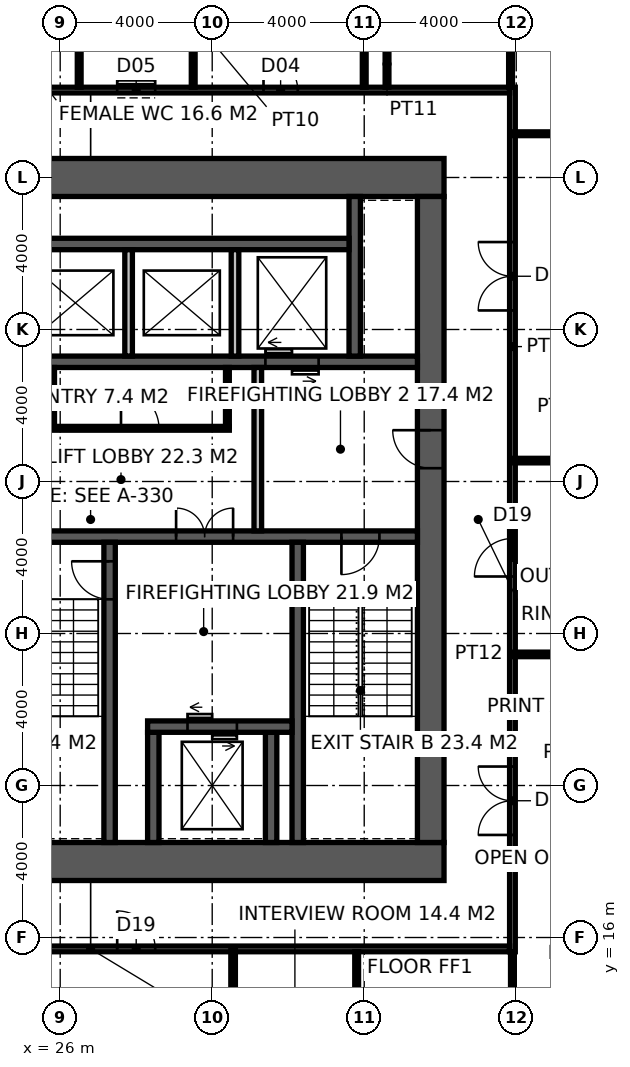
"""IFC4 building model, lengths in metres.
Left out: names, types, materials, properties, quantities, classifications, styles, units other than length and angle.
Written with IfcOpenShell. Run it as: python <this file> out.ifc"""

import sys

from ifc_helpers import new_model, si_unit, direction, frame, frame_2d, origin, place, context, subcontext, project, spatial, rectangle, extrude, element, fill, save


model = new_model("IFC4")
c1 = context("Model", 3, precision=1e-05, world=origin(), true_north=direction((0.0, 1.0)))
c2 = subcontext(c1, "Body", "Model", "MODEL_VIEW")
j1 = project(units=[si_unit("LENGTHUNIT", "METRE"), si_unit("PLANEANGLEUNIT", "RADIAN")], contexts=[c1])
p1 = place(None, origin())
s1 = spatial("IfcSite", under=j1, at=p1, CompositionType="ELEMENT")
p2 = place(p1, origin())
s2 = spatial("IfcBuilding", under=s1, at=p2, CompositionType="ELEMENT")
p3 = place(p2, frame((0.0, 0.0, 171.8)))
s3 = spatial("IfcBuildingStorey", under=s2, at=p3, CompositionType="ELEMENT", Elevation=171.8)
p4 = place(p3, frame((18.5, 18.0, -0.15), z_axis=(0.0, 0.0, 1.0), x_axis=(1.0, 0.0, 0.0)))
e1 = element("IfcWall", 1, at=p4, inside=s3, PredefinedType="SHEAR", context=c2, shape_type="SweptSolid", body=[
    extrude(rectangle(XDim=17.6, YDim=1.0, at=frame_2d((8.8, 0.0))), origin(), (0.0, 0.0, 1.0), 4.0),
])
p5 = place(p4, frame((3.45, 0.0, 0.15)))
e2 = element("IfcOpeningElement", 2, at=p5, cuts=e1, PredefinedType="OPENING", context=c2, shape_type="SweptSolid", body=[
    extrude(rectangle(XDim=1.5, YDim=2.4, at=frame_2d((0.75, 1.2))), frame((0.0, 0.51, 0.0), z_axis=(0.0, -1.0, 0.0), x_axis=(1.0, 0.0, 0.0)), (0.0, 0.0, 1.0), 1.02),
])
p6 = place(p3, frame((18.5, 36.0, -0.15), z_axis=(0.0, 0.0, 1.0), x_axis=(1.0, 0.0, 0.0)))
e3 = element("IfcWall", 3, at=p6, inside=s3, PredefinedType="SHEAR", context=c2, shape_type="SweptSolid", body=[
    extrude(rectangle(XDim=17.6, YDim=1.0, at=frame_2d((8.8, 0.0))), origin(), (0.0, 0.0, 1.0), 4.0),
])
p7 = place(p3, frame((35.75, 18.5, -0.15), z_axis=(0.0, 0.0, 1.0), x_axis=(0.0, 1.0, 0.0)))
e4 = element("IfcWall", 4, at=p7, inside=s3, PredefinedType="SHEAR", context=c2, shape_type="SweptSolid", body=[
    extrude(rectangle(XDim=17.0, YDim=0.7, at=frame_2d((8.5, 0.0))), origin(), (0.0, 0.0, 1.0), 4.0),
])
p8 = place(p7, frame((9.85, 0.0, 0.15)))
e5 = element("IfcOpeningElement", 5, at=p8, cuts=e4, PredefinedType="OPENING", context=c2, shape_type="SweptSolid", body=[
    extrude(rectangle(XDim=1.0, YDim=2.2, at=frame_2d((0.5, 1.1))), frame((0.0, 0.36, 0.0), z_axis=(0.0, -1.0, 0.0), x_axis=(1.0, 0.0, 0.0)), (0.0, 0.0, 1.0), 0.72),
])
p9 = place(p3, frame((24.15, 26.55, -0.15), z_axis=(0.0, 0.0, 1.0), x_axis=(1.0, 0.0, 0.0)))
e6 = element("IfcWall", 6, at=p9, inside=s3, PredefinedType="SHEAR", context=c2, shape_type="SweptSolid", body=[
    extrude(rectangle(XDim=11.25, YDim=0.3, at=frame_2d((5.625, 0.0))), origin(), (0.0, 0.0, 1.0), 4.0),
])
p10 = place(p9, frame((9.25, 0.0, 0.15)))
e7 = element("IfcOpeningElement", 7, at=p10, cuts=e6, PredefinedType="OPENING", context=c2, shape_type="SweptSolid", body=[
    extrude(rectangle(XDim=1.0, YDim=2.2, at=frame_2d((0.5, 1.1))), frame((0.0, 0.16, 0.0), z_axis=(0.0, -1.0, 0.0), x_axis=(1.0, 0.0, 0.0)), (0.0, 0.0, 1.0), 0.32),
])
p11 = place(p9, frame((4.9, 0.0, 0.15)))
e8 = element("IfcOpeningElement", 8, at=p11, cuts=e6, PredefinedType="OPENING", context=c2, shape_type="SweptSolid", body=[
    extrude(rectangle(XDim=1.5, YDim=2.4, at=frame_2d((0.75, 1.2))), frame((0.0, 0.16, 0.0), z_axis=(0.0, -1.0, 0.0), x_axis=(1.0, 0.0, 0.0)), (0.0, 0.0, 1.0), 0.32),
])
p12 = place(p3, frame((27.3, 18.5, -0.15), z_axis=(0.0, 0.0, 1.0), x_axis=(0.0, 1.0, 0.0)))
e9 = element("IfcWall", 9, at=p12, inside=s3, PredefinedType="SHEAR", context=c2, shape_type="SweptSolid", body=[
    extrude(rectangle(XDim=7.9, YDim=0.3, at=frame_2d((3.95, 0.0))), origin(), (0.0, 0.0, 1.0), 4.0),
])
p13 = place(p12, frame((6.4, 0.0, 0.15)))
e10 = element("IfcOpeningElement", 10, at=p13, cuts=e9, PredefinedType="OPENING", context=c2, shape_type="SweptSolid", body=[
    extrude(rectangle(XDim=1.0, YDim=2.2, at=frame_2d((0.5, 1.1))), frame((0.0, 0.16, 0.0), z_axis=(0.0, -1.0, 0.0), x_axis=(1.0, 0.0, 0.0)), (0.0, 0.0, 1.0), 0.32),
])
p14 = place(p3, frame((32.25, 18.5, -0.15), z_axis=(0.0, 0.0, 1.0), x_axis=(0.0, 1.0, 0.0)))
e11 = element("IfcWall", 11, at=p14, inside=s3, PredefinedType="SHEAR", context=c2, shape_type="SweptSolid", body=[
    extrude(rectangle(XDim=7.9, YDim=0.3, at=frame_2d((3.95, 0.0))), origin(), (0.0, 0.0, 1.0), 4.0),
])
for number, where, z_axis, x_axis in (
    (12, (28.45, 18.5, -0.15), (0.0, 0.0, 1.0), (0.0, 1.0, 0.0)),
    (13, (31.55, 18.5, -0.15), (0.0, 0.0, 1.0), (0.0, 1.0, 0.0)),
):
    element("IfcWall", number, at=place(p3, frame(where, z_axis=z_axis, x_axis=x_axis)), inside=s3, PredefinedType="SHEAR", context=c2, shape_type="SweptSolid", body=[
        extrude(rectangle(XDim=2.9, YDim=0.3, at=frame_2d((1.45, 0.0))), origin(), (0.0, 0.0, 1.0), 4.0),
    ])
p15 = place(p3, frame((28.3, 21.55, -0.15), z_axis=(0.0, 0.0, 1.0), x_axis=(1.0, 0.0, 0.0)))
e14 = element("IfcWall", 14, at=p15, inside=s3, PredefinedType="SHEAR", context=c2, shape_type="SweptSolid", body=[
    extrude(rectangle(XDim=3.8, YDim=0.3, at=frame_2d((1.9, 0.0))), origin(), (0.0, 0.0, 1.0), 4.0),
])
p16 = place(p15, frame((1.05, 0.0, 0.15)))
e15 = element("IfcOpeningElement", 15, at=p16, cuts=e14, PredefinedType="OPENING", context=c2, shape_type="SweptSolid", body=[
    extrude(rectangle(XDim=1.3, YDim=2.4, at=frame_2d((0.65, 1.2))), frame((0.0, 0.16, 0.0), z_axis=(0.0, -1.0, 0.0), x_axis=(1.0, 0.0, 0.0)), (0.0, 0.0, 1.0), 0.32),
])
p17 = place(p3, frame((24.15, 31.15, -0.15), z_axis=(0.0, 0.0, 1.0), x_axis=(1.0, 0.0, 0.0)))
e16 = element("IfcWall", 16, at=p17, inside=s3, PredefinedType="SHEAR", context=c2, shape_type="SweptSolid", body=[
    extrude(rectangle(XDim=11.25, YDim=0.3, at=frame_2d((5.625, 0.0))), origin(), (0.0, 0.0, 1.0), 4.0),
])
p18 = place(p17, frame((7.25, 0.0, 0.15)))
e17 = element("IfcOpeningElement", 17, at=p18, cuts=e16, PredefinedType="OPENING", context=c2, shape_type="SweptSolid", body=[
    extrude(rectangle(XDim=1.4, YDim=2.4, at=frame_2d((0.7, 1.2))), frame((0.0, 0.16, 0.0), z_axis=(0.0, -1.0, 0.0), x_axis=(1.0, 0.0, 0.0)), (0.0, 0.0, 1.0), 0.32),
])
p19 = place(p3, frame((33.75, 31.3, -0.15), z_axis=(0.0, 0.0, 1.0), x_axis=(0.0, 1.0, 0.0)))
e18 = element("IfcWall", 18, at=p19, inside=s3, PredefinedType="SHEAR", context=c2, shape_type="SweptSolid", body=[
    extrude(rectangle(XDim=4.2, YDim=0.3, at=frame_2d((2.1, 0.0))), origin(), (0.0, 0.0, 1.0), 4.0),
])
p20 = place(p3, frame((25.0, 34.25, -0.15), z_axis=(0.0, 0.0, 1.0), x_axis=(1.0, 0.0, 0.0)))
e19 = element("IfcWall", 19, at=p20, inside=s3, PredefinedType="SHEAR", context=c2, shape_type="SweptSolid", body=[
    extrude(rectangle(XDim=8.6, YDim=0.3, at=frame_2d((4.3, 0.0))), origin(), (0.0, 0.0, 1.0), 4.0),
])
for number, where, z_axis, x_axis in (
    (20, (27.8, 31.3, -0.15), (0.0, 0.0, 1.0), (0.0, 1.0, 0.0)),
    (21, (30.6, 31.3, -0.15), (0.0, 0.0, 1.0), (0.0, 1.0, 0.0)),
):
    element("IfcWall", number, at=place(p3, frame(where, z_axis=z_axis, x_axis=x_axis)), inside=s3, PredefinedType="SOLIDWALL", context=c2, shape_type="SweptSolid", body=[
        extrude(rectangle(XDim=2.8, YDim=0.2, at=frame_2d((1.4, 0.0))), origin(), (0.0, 0.0, 1.0), 4.0),
    ])
p21 = place(p3, frame((31.2, 26.7, 0.0), z_axis=(0.0, 0.0, 1.0), x_axis=(0.0, 1.0, 0.0)))
e22 = element("IfcWall", 22, at=p21, inside=s3, PredefinedType="SOLIDWALL", context=c2, shape_type="SweptSolid", body=[
    extrude(rectangle(XDim=4.3, YDim=0.2, at=frame_2d((2.15, 0.0))), origin(), (0.0, 0.0, 1.0), 3.85),
])
p22 = place(p3, frame((25.75, 29.4, 0.0), z_axis=(0.0, 0.0, 1.0), x_axis=(1.0, 0.0, 0.0)))
e23 = element("IfcWall", 23, at=p22, inside=s3, PredefinedType="PARTITIONING", context=c2, shape_type="SweptSolid", body=[
    extrude(rectangle(XDim=4.7, YDim=0.1, at=frame_2d((2.35, 0.0))), origin(), (0.0, 0.0, 1.0), 3.85),
])
p23 = place(p22, frame((1.85, 0.0, 0.0)))
e24 = element("IfcOpeningElement", 24, at=p23, cuts=e23, PredefinedType="OPENING", context=c2, shape_type="SweptSolid", body=[
    extrude(rectangle(XDim=1.0, YDim=2.2, at=frame_2d((0.5, 1.1))), frame((0.0, 0.06, 0.0), z_axis=(0.0, -1.0, 0.0), x_axis=(1.0, 0.0, 0.0)), (0.0, 0.0, 1.0), 0.12),
])
for number, where, z_axis, x_axis in (
    (25, (25.8, 29.45, 0.0), (0.0, 0.0, 1.0), (0.0, 1.0, 0.0)),
    (26, (30.4, 29.45, 0.0), (0.0, 0.0, 1.0), (0.0, 1.0, 0.0)),
):
    element("IfcWall", number, at=place(p3, frame(where, z_axis=z_axis, x_axis=x_axis)), inside=s3, PredefinedType="PARTITIONING", context=c2, shape_type="SweptSolid", body=[
        extrude(rectangle(XDim=1.55, YDim=0.1, at=frame_2d((0.775, 0.0))), origin(), (0.0, 0.0, 1.0), 3.85),
    ])
p24 = place(p3, frame((37.9, 15.625, 0.0), z_axis=(0.0, 0.0, 1.0), x_axis=(0.0, 1.0, 0.0)))
e27 = element("IfcWall", 27, at=p24, inside=s3, PredefinedType="PARTITIONING", context=c2, shape_type="SweptSolid", body=[
    extrude(rectangle(XDim=22.75, YDim=0.15, at=frame_2d((11.375, 0.0))), origin(), (0.0, 0.0, 1.0), 2.65),
])
p25 = place(p24, frame((3.074, 0.0, 0.0)))
e28 = element("IfcOpeningElement", 28, at=p25, cuts=e27, PredefinedType="OPENING", context=c2, shape_type="SweptSolid", body=[
    extrude(rectangle(XDim=1.8, YDim=2.4, at=frame_2d((0.9, 1.2))), frame((0.0, 0.085, 0.0), z_axis=(0.0, -1.0, 0.0), x_axis=(1.0, 0.0, 0.0)), (0.0, 0.0, 1.0), 0.17),
])
p26 = place(p24, frame((16.876, 0.0, 0.0)))
e29 = element("IfcOpeningElement", 29, at=p26, cuts=e27, PredefinedType="OPENING", context=c2, shape_type="SweptSolid", body=[
    extrude(rectangle(XDim=1.8, YDim=2.4, at=frame_2d((0.9, 1.2))), frame((0.0, 0.085, 0.0), z_axis=(0.0, -1.0, 0.0), x_axis=(1.0, 0.0, 0.0)), (0.0, 0.0, 1.0), 0.17),
])
p27 = place(p24, frame((9.875, 0.0, 0.0)))
e30 = element("IfcOpeningElement", 30, at=p27, cuts=e27, PredefinedType="OPENING", context=c2, shape_type="SweptSolid", body=[
    extrude(rectangle(XDim=1.0, YDim=2.2, at=frame_2d((0.5, 1.1))), frame((0.0, 0.085, 0.0), z_axis=(0.0, -1.0, 0.0), x_axis=(1.0, 0.0, 0.0)), (0.0, 0.0, 1.0), 0.17),
])
p28 = place(p3, frame((15.775, 15.7, 0.0), z_axis=(0.0, 0.0, 1.0), x_axis=(1.0, 0.0, 0.0)))
e31 = element("IfcWall", 31, at=p28, inside=s3, PredefinedType="PARTITIONING", context=c2, shape_type="SweptSolid", body=[
    extrude(rectangle(XDim=22.05, YDim=0.15, at=frame_2d((11.025, 0.0))), origin(), (0.0, 0.0, 1.0), 3.85),
])
p29 = place(p28, frame((11.725, 0.0, 0.0)))
e32 = element("IfcOpeningElement", 32, at=p29, cuts=e31, PredefinedType="OPENING", context=c2, shape_type="SweptSolid", body=[
    extrude(rectangle(XDim=1.0, YDim=2.2, at=frame_2d((0.5, 1.1))), frame((0.0, 0.085, 0.0), z_axis=(0.0, -1.0, 0.0), x_axis=(1.0, 0.0, 0.0)), (0.0, 0.0, 1.0), 0.17),
])
p30 = place(p3, frame((15.775, 38.3, 0.0), z_axis=(0.0, 0.0, 1.0), x_axis=(1.0, 0.0, 0.0)))
e33 = element("IfcWall", 33, at=p30, inside=s3, PredefinedType="PARTITIONING", context=c2, shape_type="SweptSolid", body=[
    extrude(rectangle(XDim=22.05, YDim=0.15, at=frame_2d((11.025, 0.0))), origin(), (0.0, 0.0, 1.0), 3.85),
])
p31 = place(p30, frame((7.975, 0.0, 0.0)))
e34 = element("IfcOpeningElement", 34, at=p31, cuts=e33, PredefinedType="OPENING", context=c2, shape_type="SweptSolid", body=[
    extrude(rectangle(XDim=0.9, YDim=2.1, at=frame_2d((0.45, 1.05))), frame((0.0, 0.085, 0.0), z_axis=(0.0, -1.0, 0.0), x_axis=(1.0, 0.0, 0.0)), (0.0, 0.0, 1.0), 0.17),
])
p32 = place(p30, frame((11.725, 0.0, 0.0)))
e35 = element("IfcOpeningElement", 35, at=p32, cuts=e33, PredefinedType="OPENING", context=c2, shape_type="SweptSolid", body=[
    extrude(rectangle(XDim=1.0, YDim=2.1, at=frame_2d((0.5, 1.05))), frame((0.0, 0.085, 0.0), z_axis=(0.0, -1.0, 0.0), x_axis=(1.0, 0.0, 0.0)), (0.0, 0.0, 1.0), 0.17),
])
p33 = place(p30, frame((15.575, 0.0, 0.0)))
e36 = element("IfcOpeningElement", 36, at=p33, cuts=e33, PredefinedType="OPENING", context=c2, shape_type="SweptSolid", body=[
    extrude(rectangle(XDim=0.9, YDim=2.1, at=frame_2d((0.45, 1.05))), frame((0.0, 0.085, 0.0), z_axis=(0.0, -1.0, 0.0), x_axis=(1.0, 0.0, 0.0)), (0.0, 0.0, 1.0), 0.17),
])
p34 = place(p3, frame((34.0, 38.375, 0.0), z_axis=(0.0, 0.0, 1.0), x_axis=(0.0, 1.0, 0.0)))
e37 = element("IfcWall", 37, at=p34, inside=s3, PredefinedType="PARTITIONING", context=c2, shape_type="SweptSolid", body=[
    extrude(rectangle(XDim=3.675, YDim=0.1, at=frame_2d((1.837, 0.0))), origin(), (0.0, 0.0, 1.0), 2.95),
])
for number, where, z_axis, x_axis in (
    (38, (26.5, 38.375, 0.0), (0.0, 0.0, 1.0), (0.0, 1.0, 0.0)),
    (39, (29.5, 38.375, 0.0), (0.0, 0.0, 1.0), (0.0, 1.0, 0.0)),
):
    element("IfcWall", number, at=place(p3, frame(where, z_axis=z_axis, x_axis=x_axis)), inside=s3, PredefinedType="PARTITIONING", context=c2, shape_type="SweptSolid", body=[
        extrude(rectangle(XDim=3.575, YDim=0.1, at=frame_2d((1.788, 0.0))), origin(), (0.0, 0.0, 1.0), 3.85),
    ])
p35 = place(p3, frame((30.55, 8.68, 0.0), z_axis=(0.0, 0.0, 1.0), x_axis=(0.0, 1.0, 0.0)))
e40 = element("IfcWall", 40, at=p35, inside=s3, PredefinedType="PARTITIONING", context=c2, shape_type="SweptSolid", body=[
    extrude(rectangle(XDim=7.02, YDim=0.12, at=frame_2d((3.51, 0.0))), origin(), (0.0, 0.0, 1.0), 2.65),
])
for number, where, z_axis, x_axis in (
    (41, (37.9, 23.45, 0.0), (0.0, 0.0, 1.0), (1.0, 0.0, 0.0)),
    (42, (37.9, 28.55, 0.0), (0.0, 0.0, 1.0), (1.0, 0.0, 0.0)),
):
    element("IfcWall", number, at=place(p3, frame(where, z_axis=z_axis, x_axis=x_axis)), inside=s3, PredefinedType="PARTITIONING", context=c2, shape_type="SweptSolid", body=[
        extrude(rectangle(XDim=7.42, YDim=0.12, at=frame_2d((3.71, 0.0))), origin(), (0.0, 0.0, 1.0), 2.65),
    ])
p36 = place(p3, frame((33.801, 10.95, 0.0), z_axis=(0.0, 0.0, 1.0), x_axis=(0.0, 1.0, 0.0)))
e43 = element("IfcWall", 43, at=p36, inside=s3, PredefinedType="PARTITIONING", context=c2, shape_type="SweptSolid", body=[
    extrude(rectangle(XDim=4.675, YDim=0.1, at=frame_2d((2.337, 0.0))), origin(), (0.0, 0.0, 1.0), 2.65),
])
p37 = place(p3, frame((34.6, 38.375, 0.0), z_axis=(0.0, 0.0, 1.0), x_axis=(0.0, 1.0, 0.0)))
e44 = element("IfcWall", 44, at=p37, inside=s3, PredefinedType="PARTITIONING", context=c2, shape_type="SweptSolid", body=[
    extrude(rectangle(XDim=4.075, YDim=0.1, at=frame_2d((2.038, 0.0))), origin(), (0.0, 0.0, 1.0), 3.85),
])
p38 = place(p3, frame((37.85, 38.375, 0.0), z_axis=(0.0, 0.0, 1.0), x_axis=(0.0, 1.0, 0.0)))
e45 = element("IfcWall", 45, at=p38, inside=s3, PredefinedType="PARTITIONING", context=c2, shape_type="SweptSolid", body=[
    extrude(rectangle(XDim=4.075, YDim=0.1, at=frame_2d((2.038, 0.0))), origin(), (0.0, 0.0, 1.0), 2.65),
])
p39 = place(p3, frame((37.9, 10.95, 0.0), z_axis=(0.0, 0.0, 1.0), x_axis=(0.0, 1.0, 0.0)))
e46 = element("IfcWall", 46, at=p39, inside=s3, PredefinedType="PARTITIONING", context=c2, shape_type="SweptSolid", body=[
    extrude(rectangle(XDim=4.675, YDim=0.1, at=frame_2d((2.337, 0.0))), origin(), (0.0, 0.0, 1.0), 2.65),
])
p40 = place(p3, frame((37.9, 37.151, 0.0), z_axis=(0.0, 0.0, 1.0), x_axis=(1.0, 0.0, 0.0)))
e47 = element("IfcWall", 47, at=p40, inside=s3, PredefinedType="PARTITIONING", context=c2, shape_type="SweptSolid", body=[
    extrude(rectangle(XDim=4.5, YDim=0.1, at=frame_2d((2.25, 0.0))), origin(), (0.0, 0.0, 1.0), 3.85),
])
p41 = place(p13, origin())
e48 = element("IfcDoor", 48, at=p41, inside=s3, OperationType="SINGLE_SWING_RIGHT", PredefinedType="DOOR", context=c2, shape_type="SweptSolid", body=[
    extrude(rectangle(XDim=1.0, YDim=2.2, at=frame_2d((0.5, 1.1))), frame((0.0, 0.025, 0.0), z_axis=(0.0, -1.0, 0.0), x_axis=(1.0, 0.0, 0.0)), (0.0, 0.0, 1.0), 0.05),
])
fill(e10, e48)
p42 = place(p10, frame((1.0, 0.0, 0.0), z_axis=(0.0, 0.0, 1.0), x_axis=(-1.0, 0.0, 0.0)))
e49 = element("IfcDoor", 49, at=p42, inside=s3, OperationType="SINGLE_SWING_RIGHT", PredefinedType="DOOR", context=c2, shape_type="SweptSolid", body=[
    extrude(rectangle(XDim=1.0, YDim=2.2, at=frame_2d((0.5, 1.1))), frame((0.0, 0.025, 0.0), z_axis=(0.0, -1.0, 0.0), x_axis=(1.0, 0.0, 0.0)), (0.0, 0.0, 1.0), 0.05),
])
fill(e7, e49)
p43 = place(p8, origin())
e50 = element("IfcDoor", 50, at=p43, inside=s3, OperationType="SINGLE_SWING_RIGHT", PredefinedType="DOOR", context=c2, shape_type="SweptSolid", body=[
    extrude(rectangle(XDim=1.0, YDim=2.2, at=frame_2d((0.5, 1.1))), frame((0.0, 0.025, 0.0), z_axis=(0.0, -1.0, 0.0), x_axis=(1.0, 0.0, 0.0)), (0.0, 0.0, 1.0), 0.05),
])
fill(e5, e50)
p44 = place(p11, origin())
e51 = element("IfcDoor", 51, at=p44, inside=s3, OperationType="DOUBLE_DOOR_DOUBLE_SWING", PredefinedType="DOOR", context=c2, shape_type="SweptSolid", body=[
    extrude(rectangle(XDim=1.5, YDim=2.4, at=frame_2d((0.75, 1.2))), frame((0.0, 0.025, 0.0), z_axis=(0.0, -1.0, 0.0), x_axis=(1.0, 0.0, 0.0)), (0.0, 0.0, 1.0), 0.05),
])
fill(e8, e51)
p45 = place(p23, origin())
e52 = element("IfcDoor", 52, at=p45, inside=s3, OperationType="SINGLE_SWING_LEFT", PredefinedType="DOOR", context=c2, shape_type="SweptSolid", body=[
    extrude(rectangle(XDim=1.0, YDim=2.2, at=frame_2d((0.5, 1.1))), frame((0.0, 0.025, 0.0), z_axis=(0.0, -1.0, 0.0), x_axis=(1.0, 0.0, 0.0)), (0.0, 0.0, 1.0), 0.05),
])
fill(e24, e52)
p46 = place(p32, origin())
e53 = element("IfcDoor", 53, at=p46, inside=s3, OperationType="SLIDING_TO_LEFT", PredefinedType="DOOR", context=c2, shape_type="SweptSolid", body=[
    extrude(rectangle(XDim=1.0, YDim=2.1, at=frame_2d((0.5, 1.05))), frame((0.0, 0.025, 0.0), z_axis=(0.0, -1.0, 0.0), x_axis=(1.0, 0.0, 0.0)), (0.0, 0.0, 1.0), 0.05),
])
fill(e35, e53)
p47 = place(p33, origin())
e54 = element("IfcDoor", 54, at=p47, inside=s3, OperationType="SINGLE_SWING_LEFT", PredefinedType="DOOR", context=c2, shape_type="SweptSolid", body=[
    extrude(rectangle(XDim=0.9, YDim=2.1, at=frame_2d((0.45, 1.05))), frame((0.0, 0.025, 0.0), z_axis=(0.0, -1.0, 0.0), x_axis=(1.0, 0.0, 0.0)), (0.0, 0.0, 1.0), 0.05),
])
fill(e36, e54)
p48 = place(p25, origin())
e55 = element("IfcDoor", 55, at=p48, inside=s3, OperationType="DOUBLE_DOOR_DOUBLE_SWING", PredefinedType="DOOR", context=c2, shape_type="SweptSolid", body=[
    extrude(rectangle(XDim=1.8, YDim=2.4, at=frame_2d((0.9, 1.2))), frame((0.0, 0.025, 0.0), z_axis=(0.0, -1.0, 0.0), x_axis=(1.0, 0.0, 0.0)), (0.0, 0.0, 1.0), 0.05),
])
fill(e28, e55)
p49 = place(p26, origin())
e56 = element("IfcDoor", 56, at=p49, inside=s3, OperationType="DOUBLE_DOOR_DOUBLE_SWING", PredefinedType="DOOR", context=c2, shape_type="SweptSolid", body=[
    extrude(rectangle(XDim=1.8, YDim=2.4, at=frame_2d((0.9, 1.2))), frame((0.0, 0.025, 0.0), z_axis=(0.0, -1.0, 0.0), x_axis=(1.0, 0.0, 0.0)), (0.0, 0.0, 1.0), 0.05),
])
fill(e29, e56)
p50 = place(p29, origin())
e57 = element("IfcDoor", 57, at=p50, inside=s3, OperationType="SINGLE_SWING_LEFT", PredefinedType="DOOR", context=c2, shape_type="SweptSolid", body=[
    extrude(rectangle(XDim=1.0, YDim=2.2, at=frame_2d((0.5, 1.1))), frame((0.0, 0.025, 0.0), z_axis=(0.0, -1.0, 0.0), x_axis=(1.0, 0.0, 0.0)), (0.0, 0.0, 1.0), 0.05),
])
fill(e32, e57)
p51 = place(p27, origin())
e58 = element("IfcDoor", 58, at=p51, inside=s3, OperationType="SINGLE_SWING_LEFT", PredefinedType="DOOR", context=c2, shape_type="SweptSolid", body=[
    extrude(rectangle(XDim=1.0, YDim=2.2, at=frame_2d((0.5, 1.1))), frame((0.0, 0.025, 0.0), z_axis=(0.0, -1.0, 0.0), x_axis=(1.0, 0.0, 0.0)), (0.0, 0.0, 1.0), 0.05),
])
fill(e30, e58)
p52 = place(p16, origin())
e59 = element("IfcDoor", 59, at=p52, inside=s3, OperationType="DOUBLE_DOOR_SLIDING", PredefinedType="DOOR", context=c2, shape_type="SweptSolid", body=[
    extrude(rectangle(XDim=1.3, YDim=2.4, at=frame_2d((0.65, 1.2))), frame((0.0, 0.025, 0.0), z_axis=(0.0, -1.0, 0.0), x_axis=(1.0, 0.0, 0.0)), (0.0, 0.0, 1.0), 0.05),
])
fill(e15, e59)
p53 = place(p18, origin())
e60 = element("IfcDoor", 60, at=p53, inside=s3, OperationType="DOUBLE_DOOR_SLIDING", PredefinedType="DOOR", context=c2, shape_type="SweptSolid", body=[
    extrude(rectangle(XDim=1.4, YDim=2.4, at=frame_2d((0.7, 1.2))), frame((0.0, 0.025, 0.0), z_axis=(0.0, -1.0, 0.0), x_axis=(1.0, 0.0, 0.0)), (0.0, 0.0, 1.0), 0.05),
])
fill(e17, e60)
save(model, sys.argv[1])
